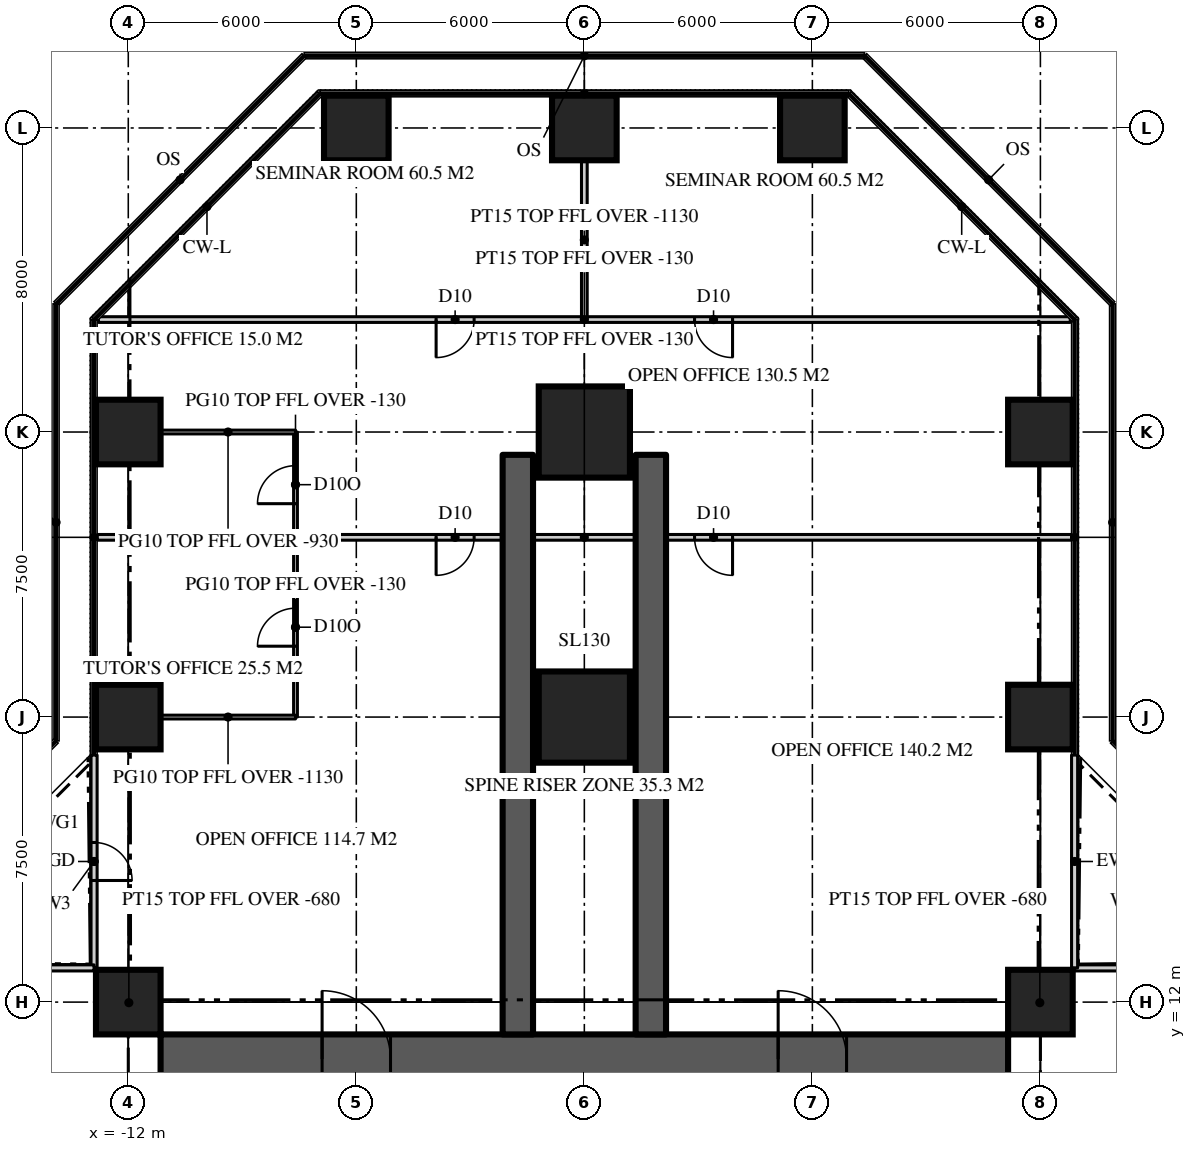
"""IFC4 building model, lengths in metres.
Left out: names, types, materials, properties, quantities, classifications, styles, units other than length and angle.
Written with IfcOpenShell. Run it as: python <this file> out.ifc"""

import sys

from ifc_helpers import new_model, si_unit, direction, frame, frame_2d, origin, origin_2d, place, context, subcontext, project, spatial, rectangle, extrude, element, fill, save


model = new_model("IFC4")
c1 = context("Model", 3, precision=1e-05, world=origin(), true_north=direction((0.0, 1.0)))
c2 = subcontext(c1, "Body", "Model", "MODEL_VIEW")
j1 = project(units=[si_unit("LENGTHUNIT", "METRE"), si_unit("PLANEANGLEUNIT", "RADIAN")], contexts=[c1])
p1 = place(None, origin())
s1 = spatial("IfcSite", under=j1, at=p1, CompositionType="ELEMENT")
p2 = place(p1, origin())
s2 = spatial("IfcBuilding", under=s1, at=p2, CompositionType="ELEMENT")
p3 = place(p2, frame((0.0, 0.0, 105.9)))
s3 = spatial("IfcBuildingStorey", under=s2, at=p3, CompositionType="ELEMENT", Elevation=105.9)
p4 = place(p3, frame((-11.15, 10.5, 0.0), z_axis=(0.0, 0.0, 1.0), x_axis=(1.0, 0.0, 0.0)))
e1 = element("IfcWall", 1, at=p4, inside=s3, PredefinedType="SHEAR", context=c2, shape_type="SweptSolid", body=[
    extrude(rectangle(XDim=22.3, YDim=1.3, at=frame_2d((11.15, 0.0))), origin(), (0.0, 0.0, 1.0), 3.9),
])
p5 = place(p4, frame((4.25, 0.0, 0.0)))
e2 = element("IfcOpeningElement", 2, at=p5, cuts=e1, PredefinedType="OPENING", context=c2, shape_type="SweptSolid", body=[
    extrude(rectangle(XDim=1.8, YDim=2.2, at=frame_2d((0.9, 1.1))), frame((0.0, 0.66, 0.0), z_axis=(0.0, -1.0, 0.0), x_axis=(1.0, 0.0, 0.0)), (0.0, 0.0, 1.0), 1.32),
])
p6 = place(p4, frame((16.25, 0.0, 0.0)))
e3 = element("IfcOpeningElement", 3, at=p6, cuts=e1, PredefinedType="OPENING", context=c2, shape_type="SweptSolid", body=[
    extrude(rectangle(XDim=1.8, YDim=2.2, at=frame_2d((0.9, 1.1))), frame((0.0, 0.66, 0.0), z_axis=(0.0, -1.0, 0.0), x_axis=(1.0, 0.0, 0.0)), (0.0, 0.0, 1.0), 1.32),
])
for number, where, z_axis, x_axis in (
    (4, (1.75, 11.15, 0.0), (0.0, 0.0, 1.0), (0.0, 1.0, 0.0)),
    (5, (-1.75, 11.15, 0.0), (0.0, 0.0, 1.0), (0.0, 1.0, 0.0)),
):
    element("IfcWall", number, at=place(p3, frame(where, z_axis=z_axis, x_axis=x_axis)), inside=s3, PredefinedType="SHEAR", context=c2, shape_type="SweptSolid", body=[
        extrude(rectangle(XDim=15.25, YDim=0.8, at=frame_2d((7.625, 0.0))), origin(), (0.0, 0.0, 1.0), 3.9),
    ])
for number, where, z_axis, x_axis in (
    (6, (-12.0, 12.0, 0.0), (0.0, 0.0, 1.0), (1.0, 0.0, 0.0)),
    (7, (12.0, 12.0, 0.0), (0.0, 0.0, 1.0), (1.0, 0.0, 0.0)),
    (8, (-12.0, 19.5, 0.0), (0.0, 0.0, 1.0), (1.0, 0.0, 0.0)),
):
    element("IfcColumn", number, at=place(p3, frame(where, z_axis=z_axis, x_axis=x_axis)), inside=s3, PredefinedType="COLUMN", context=c2, shape_type="SweptSolid", body=[
        extrude(rectangle(XDim=1.7, YDim=1.7, at=origin_2d()), origin(), (0.0, 0.0, 1.0), 3.9),
    ])
p7 = place(p3, frame((0.0, 19.5, 0.0), z_axis=(0.0, 0.0, 1.0), x_axis=(1.0, 0.0, 0.0)))
e9 = element("IfcColumn", 9, at=p7, inside=s3, PredefinedType="COLUMN", context=c2, shape_type="SweptSolid", body=[
    extrude(rectangle(XDim=2.4, YDim=2.4, at=origin_2d()), origin(), (0.0, 0.0, 1.0), 3.9),
])
for number, where, z_axis, x_axis in (
    (10, (12.0, 19.5, 0.0), (0.0, 0.0, 1.0), (1.0, 0.0, 0.0)),
    (11, (-12.0, 27.0, 0.0), (0.0, 0.0, 1.0), (1.0, 0.0, 0.0)),
):
    element("IfcColumn", number, at=place(p3, frame(where, z_axis=z_axis, x_axis=x_axis)), inside=s3, PredefinedType="COLUMN", context=c2, shape_type="SweptSolid", body=[
        extrude(rectangle(XDim=1.7, YDim=1.7, at=origin_2d()), origin(), (0.0, 0.0, 1.0), 3.9),
    ])
p8 = place(p3, frame((0.0, 27.0, 0.0), z_axis=(0.0, 0.0, 1.0), x_axis=(1.0, 0.0, 0.0)))
e12 = element("IfcColumn", 12, at=p8, inside=s3, PredefinedType="COLUMN", context=c2, shape_type="SweptSolid", body=[
    extrude(rectangle(XDim=2.4, YDim=2.4, at=origin_2d()), origin(), (0.0, 0.0, 1.0), 3.9),
])
for number, where, z_axis, x_axis in (
    (13, (12.0, 27.0, 0.0), (0.0, 0.0, 1.0), (1.0, 0.0, 0.0)),
    (14, (-6.0, 35.0, 0.0), (0.0, 0.0, 1.0), (1.0, 0.0, 0.0)),
    (15, (0.0, 35.0, 0.0), (0.0, 0.0, 1.0), (1.0, 0.0, 0.0)),
    (16, (6.0, 35.0, 0.0), (0.0, 0.0, 1.0), (1.0, 0.0, 0.0)),
):
    element("IfcColumn", number, at=place(p3, frame(where, z_axis=z_axis, x_axis=x_axis)), inside=s3, PredefinedType="COLUMN", context=c2, shape_type="SweptSolid", body=[
        extrude(rectangle(XDim=1.7, YDim=1.7, at=origin_2d()), origin(), (0.0, 0.0, 1.0), 3.9),
    ])
p9 = place(p3, frame((18.5, 12.9, 0.0), z_axis=(0.0, 0.0, 1.0), x_axis=(-1.0, 0.0, 0.0)))
e17 = element("IfcWall", 17, at=p9, inside=s3, PredefinedType="SOLIDWALL", context=c2, shape_type="SweptSolid", body=[
    extrude(rectangle(XDim=5.6, YDim=0.16, at=frame_2d((2.8, 0.0))), origin(), (0.0, 0.0, 1.0), 3.77),
])
p10 = place(p9, frame((2.3, 0.0, 0.0)))
e18 = element("IfcOpeningElement", 18, at=p10, cuts=e17, PredefinedType="OPENING", context=c2, shape_type="SweptSolid", body=[
    extrude(rectangle(XDim=1.0, YDim=2.2, at=frame_2d((0.5, 1.1))), frame((0.0, 0.09, 0.0), z_axis=(0.0, -1.0, 0.0), x_axis=(1.0, 0.0, 0.0)), (0.0, 0.0, 1.0), 0.18),
])
p11 = place(p3, frame((12.9, 12.9, 0.0), z_axis=(0.0, 0.0, 1.0), x_axis=(0.0, 1.0, 0.0)))
e19 = element("IfcWall", 19, at=p11, inside=s3, PredefinedType="SOLIDWALL", context=c2, shape_type="SweptSolid", body=[
    extrude(rectangle(XDim=5.6, YDim=0.16, at=frame_2d((2.8, 0.0))), origin(), (0.0, 0.0, 1.0), 3.77),
])
p12 = place(p3, frame((-12.9, 18.5, 0.0), z_axis=(0.0, 0.0, 1.0), x_axis=(0.0, -1.0, 0.0)))
e20 = element("IfcWall", 20, at=p12, inside=s3, PredefinedType="SOLIDWALL", context=c2, shape_type="SweptSolid", body=[
    extrude(rectangle(XDim=5.6, YDim=0.16, at=frame_2d((2.8, 0.0))), origin(), (0.0, 0.0, 1.0), 3.77),
])
p13 = place(p12, frame((2.3, 0.0, 0.0)))
e21 = element("IfcOpeningElement", 21, at=p13, cuts=e20, PredefinedType="OPENING", context=c2, shape_type="SweptSolid", body=[
    extrude(rectangle(XDim=1.0, YDim=2.2, at=frame_2d((0.5, 1.1))), frame((0.0, 0.09, 0.0), z_axis=(0.0, -1.0, 0.0), x_axis=(1.0, 0.0, 0.0)), (0.0, 0.0, 1.0), 0.18),
])
p14 = place(p3, frame((-12.9, 12.9, 0.0), z_axis=(0.0, 0.0, 1.0), x_axis=(-1.0, 0.0, 0.0)))
e22 = element("IfcWall", 22, at=p14, inside=s3, PredefinedType="SOLIDWALL", context=c2, shape_type="SweptSolid", body=[
    extrude(rectangle(XDim=5.6, YDim=0.16, at=frame_2d((2.8, 0.0))), origin(), (0.0, 0.0, 1.0), 3.77),
])
p15 = place(p3, frame((12.82, 24.229, 0.0), z_axis=(0.0, 0.0, 1.0), x_axis=(-1.0, 0.0, 0.0)))
e23 = element("IfcWall", 23, at=p15, inside=s3, PredefinedType="PARTITIONING", context=c2, shape_type="SweptSolid", body=[
    extrude(rectangle(XDim=25.64, YDim=0.15, at=frame_2d((12.82, 0.0))), origin(), (0.0, 0.0, 1.0), 3.77),
])
p16 = place(p15, frame((15.72, 0.0, 0.0)))
e24 = element("IfcOpeningElement", 24, at=p16, cuts=e23, PredefinedType="OPENING", context=c2, shape_type="SweptSolid", body=[
    extrude(rectangle(XDim=1.0, YDim=2.2, at=frame_2d((0.5, 1.1))), frame((0.0, 0.085, 0.0), z_axis=(0.0, -1.0, 0.0), x_axis=(1.0, 0.0, 0.0)), (0.0, 0.0, 1.0), 0.17),
])
p17 = place(p15, frame((8.92, 0.0, 0.0)))
e25 = element("IfcOpeningElement", 25, at=p17, cuts=e23, PredefinedType="OPENING", context=c2, shape_type="SweptSolid", body=[
    extrude(rectangle(XDim=1.0, YDim=2.2, at=frame_2d((0.5, 1.1))), frame((0.0, 0.085, 0.0), z_axis=(0.0, -1.0, 0.0), x_axis=(1.0, 0.0, 0.0)), (0.0, 0.0, 1.0), 0.17),
])
p18 = place(p3, frame((12.786, 29.959, 0.0), z_axis=(0.0, 0.0, 1.0), x_axis=(-1.0, 0.0, 0.0)))
e26 = element("IfcWall", 26, at=p18, inside=s3, PredefinedType="PARTITIONING", context=c2, shape_type="SweptSolid", body=[
    extrude(rectangle(XDim=25.573, YDim=0.15, at=frame_2d((12.786, 0.0))), origin(), (0.0, 0.0, 1.0), 3.77),
])
p19 = place(p18, frame((15.687, 0.0, 0.0)))
e27 = element("IfcOpeningElement", 27, at=p19, cuts=e26, PredefinedType="OPENING", context=c2, shape_type="SweptSolid", body=[
    extrude(rectangle(XDim=1.0, YDim=2.2, at=frame_2d((0.5, 1.1))), frame((0.0, 0.085, 0.0), z_axis=(0.0, -1.0, 0.0), x_axis=(1.0, 0.0, 0.0)), (0.0, 0.0, 1.0), 0.17),
])
p20 = place(p18, frame((8.886, 0.0, 0.0)))
e28 = element("IfcOpeningElement", 28, at=p20, cuts=e26, PredefinedType="OPENING", context=c2, shape_type="SweptSolid", body=[
    extrude(rectangle(XDim=1.0, YDim=2.2, at=frame_2d((0.5, 1.1))), frame((0.0, 0.085, 0.0), z_axis=(0.0, -1.0, 0.0), x_axis=(1.0, 0.0, 0.0)), (0.0, 0.0, 1.0), 0.17),
])
p21 = place(p3, frame((0.0, 29.959, 0.0), z_axis=(0.0, 0.0, 1.0), x_axis=(0.0, 1.0, 0.0)))
e29 = element("IfcWall", 29, at=p21, inside=s3, PredefinedType="PARTITIONING", context=c2, shape_type="SweptSolid", body=[
    extrude(rectangle(XDim=4.191, YDim=0.15, at=frame_2d((2.095, 0.0))), origin(), (0.0, 0.0, 1.0), 2.77),
])
p22 = place(p3, frame((-7.6, 19.5, 0.0), z_axis=(0.0, 0.0, 1.0), x_axis=(0.0, 1.0, 0.0)))
e30 = element("IfcWall", 30, at=p22, inside=s3, PredefinedType="PARTITIONING", context=c2, shape_type="SweptSolid", body=[
    extrude(rectangle(XDim=4.729, YDim=0.1, at=frame_2d((2.365, 0.0))), origin(), (0.0, 0.0, 1.0), 3.77),
])
p23 = place(p22, frame((1.865, 0.0, 0.0)))
e31 = element("IfcOpeningElement", 31, at=p23, cuts=e30, PredefinedType="OPENING", context=c2, shape_type="SweptSolid", body=[
    extrude(rectangle(XDim=1.0, YDim=2.2, at=frame_2d((0.5, 1.1))), frame((0.0, 0.06, 0.0), z_axis=(0.0, -1.0, 0.0), x_axis=(1.0, 0.0, 0.0)), (0.0, 0.0, 1.0), 0.12),
])
p24 = place(p3, frame((-7.6, 24.229, 0.0), z_axis=(0.0, 0.0, 1.0), x_axis=(0.0, 1.0, 0.0)))
e32 = element("IfcWall", 32, at=p24, inside=s3, PredefinedType="PARTITIONING", context=c2, shape_type="SweptSolid", body=[
    extrude(rectangle(XDim=2.771, YDim=0.1, at=frame_2d((1.385, 0.0))), origin(), (0.0, 0.0, 1.0), 3.77),
])
p25 = place(p24, frame((0.885, 0.0, 0.0)))
e33 = element("IfcOpeningElement", 33, at=p25, cuts=e32, PredefinedType="OPENING", context=c2, shape_type="SweptSolid", body=[
    extrude(rectangle(XDim=1.0, YDim=2.2, at=frame_2d((0.5, 1.1))), frame((0.0, 0.06, 0.0), z_axis=(0.0, -1.0, 0.0), x_axis=(1.0, 0.0, 0.0)), (0.0, 0.0, 1.0), 0.12),
])
p26 = place(p3, frame((-7.6, 19.5, 0.0), z_axis=(0.0, 0.0, 1.0), x_axis=(-1.0, 0.0, 0.0)))
e34 = element("IfcWall", 34, at=p26, inside=s3, PredefinedType="PARTITIONING", context=c2, shape_type="SweptSolid", body=[
    extrude(rectangle(XDim=3.55, YDim=0.1, at=frame_2d((1.775, 0.0))), origin(), (0.0, 0.0, 1.0), 2.77),
])
p27 = place(p3, frame((-7.6, 27.0, 0.0), z_axis=(0.0, 0.0, 1.0), x_axis=(-1.0, 0.0, 0.0)))
e35 = element("IfcWall", 35, at=p27, inside=s3, PredefinedType="PARTITIONING", context=c2, shape_type="SweptSolid", body=[
    extrude(rectangle(XDim=3.55, YDim=0.1, at=frame_2d((1.775, 0.0))), origin(), (0.0, 0.0, 1.0), 2.97),
])
for number, where, z_axis, x_axis in (
    (36, (11.15, 11.15, 0.0), (0.0, 0.0, 1.0), (0.707, 0.707, 0.0)),
    (37, (-11.15, 11.15, 0.0), (0.0, 0.0, 1.0), (-0.707, 0.707, 0.0)),
):
    element("IfcWall", number, at=place(p3, frame(where, z_axis=z_axis, x_axis=x_axis)), inside=s3, PredefinedType="PARTITIONING", context=c2, shape_type="SweptSolid", body=[
        extrude(rectangle(XDim=2.362, YDim=0.15, at=frame_2d((1.181, 0.0))), origin(), (0.0, 0.0, 1.0), 3.22),
    ])
p28 = place(p13, origin())
e38 = element("IfcDoor", 38, at=p28, inside=s3, OperationType="SINGLE_SWING_RIGHT", PredefinedType="DOOR", context=c2, shape_type="SweptSolid", body=[
    extrude(rectangle(XDim=1.0, YDim=2.2, at=frame_2d((0.5, 1.1))), frame((0.0, 0.025, 0.0), z_axis=(0.0, -1.0, 0.0), x_axis=(1.0, 0.0, 0.0)), (0.0, 0.0, 1.0), 0.05),
])
fill(e21, e38)
p29 = place(p5, origin())
e39 = element("IfcDoor", 39, at=p29, inside=s3, OperationType="DOUBLE_DOOR_DOUBLE_SWING", PredefinedType="DOOR", context=c2, shape_type="SweptSolid", body=[
    extrude(rectangle(XDim=1.8, YDim=2.2, at=frame_2d((0.9, 1.1))), frame((0.0, 0.025, 0.0), z_axis=(0.0, -1.0, 0.0), x_axis=(1.0, 0.0, 0.0)), (0.0, 0.0, 1.0), 0.05),
])
fill(e2, e39)
p30 = place(p6, origin())
e40 = element("IfcDoor", 40, at=p30, inside=s3, OperationType="DOUBLE_DOOR_DOUBLE_SWING", PredefinedType="DOOR", context=c2, shape_type="SweptSolid", body=[
    extrude(rectangle(XDim=1.8, YDim=2.2, at=frame_2d((0.9, 1.1))), frame((0.0, 0.025, 0.0), z_axis=(0.0, -1.0, 0.0), x_axis=(1.0, 0.0, 0.0)), (0.0, 0.0, 1.0), 0.05),
])
fill(e3, e40)
p31 = place(p16, origin())
e41 = element("IfcDoor", 41, at=p31, inside=s3, OperationType="SINGLE_SWING_RIGHT", PredefinedType="DOOR", context=c2, shape_type="SweptSolid", body=[
    extrude(rectangle(XDim=1.0, YDim=2.2, at=frame_2d((0.5, 1.1))), frame((0.0, 0.025, 0.0), z_axis=(0.0, -1.0, 0.0), x_axis=(1.0, 0.0, 0.0)), (0.0, 0.0, 1.0), 0.05),
])
fill(e24, e41)
p32 = place(p17, origin())
e42 = element("IfcDoor", 42, at=p32, inside=s3, OperationType="SINGLE_SWING_LEFT", PredefinedType="DOOR", context=c2, shape_type="SweptSolid", body=[
    extrude(rectangle(XDim=1.0, YDim=2.2, at=frame_2d((0.5, 1.1))), frame((0.0, 0.025, 0.0), z_axis=(0.0, -1.0, 0.0), x_axis=(1.0, 0.0, 0.0)), (0.0, 0.0, 1.0), 0.05),
])
fill(e25, e42)
p33 = place(p19, origin())
e43 = element("IfcDoor", 43, at=p33, inside=s3, OperationType="SINGLE_SWING_RIGHT", PredefinedType="DOOR", context=c2, shape_type="SweptSolid", body=[
    extrude(rectangle(XDim=1.0, YDim=2.2, at=frame_2d((0.5, 1.1))), frame((0.0, 0.025, 0.0), z_axis=(0.0, -1.0, 0.0), x_axis=(1.0, 0.0, 0.0)), (0.0, 0.0, 1.0), 0.05),
])
fill(e27, e43)
p34 = place(p20, origin())
e44 = element("IfcDoor", 44, at=p34, inside=s3, OperationType="SINGLE_SWING_LEFT", PredefinedType="DOOR", context=c2, shape_type="SweptSolid", body=[
    extrude(rectangle(XDim=1.0, YDim=2.2, at=frame_2d((0.5, 1.1))), frame((0.0, 0.025, 0.0), z_axis=(0.0, -1.0, 0.0), x_axis=(1.0, 0.0, 0.0)), (0.0, 0.0, 1.0), 0.05),
])
fill(e28, e44)
p35 = place(p23, origin())
e45 = element("IfcDoor", 45, at=p35, inside=s3, OperationType="SINGLE_SWING_LEFT", PredefinedType="DOOR", context=c2, shape_type="SweptSolid", body=[
    extrude(rectangle(XDim=1.0, YDim=2.2, at=frame_2d((0.5, 1.1))), frame((0.0, 0.025, 0.0), z_axis=(0.0, -1.0, 0.0), x_axis=(1.0, 0.0, 0.0)), (0.0, 0.0, 1.0), 0.05),
])
fill(e31, e45)
p36 = place(p25, origin())
e46 = element("IfcDoor", 46, at=p36, inside=s3, OperationType="SINGLE_SWING_LEFT", PredefinedType="DOOR", context=c2, shape_type="SweptSolid", body=[
    extrude(rectangle(XDim=1.0, YDim=2.2, at=frame_2d((0.5, 1.1))), frame((0.0, 0.025, 0.0), z_axis=(0.0, -1.0, 0.0), x_axis=(1.0, 0.0, 0.0)), (0.0, 0.0, 1.0), 0.05),
])
fill(e33, e46)
save(model, sys.argv[1])
